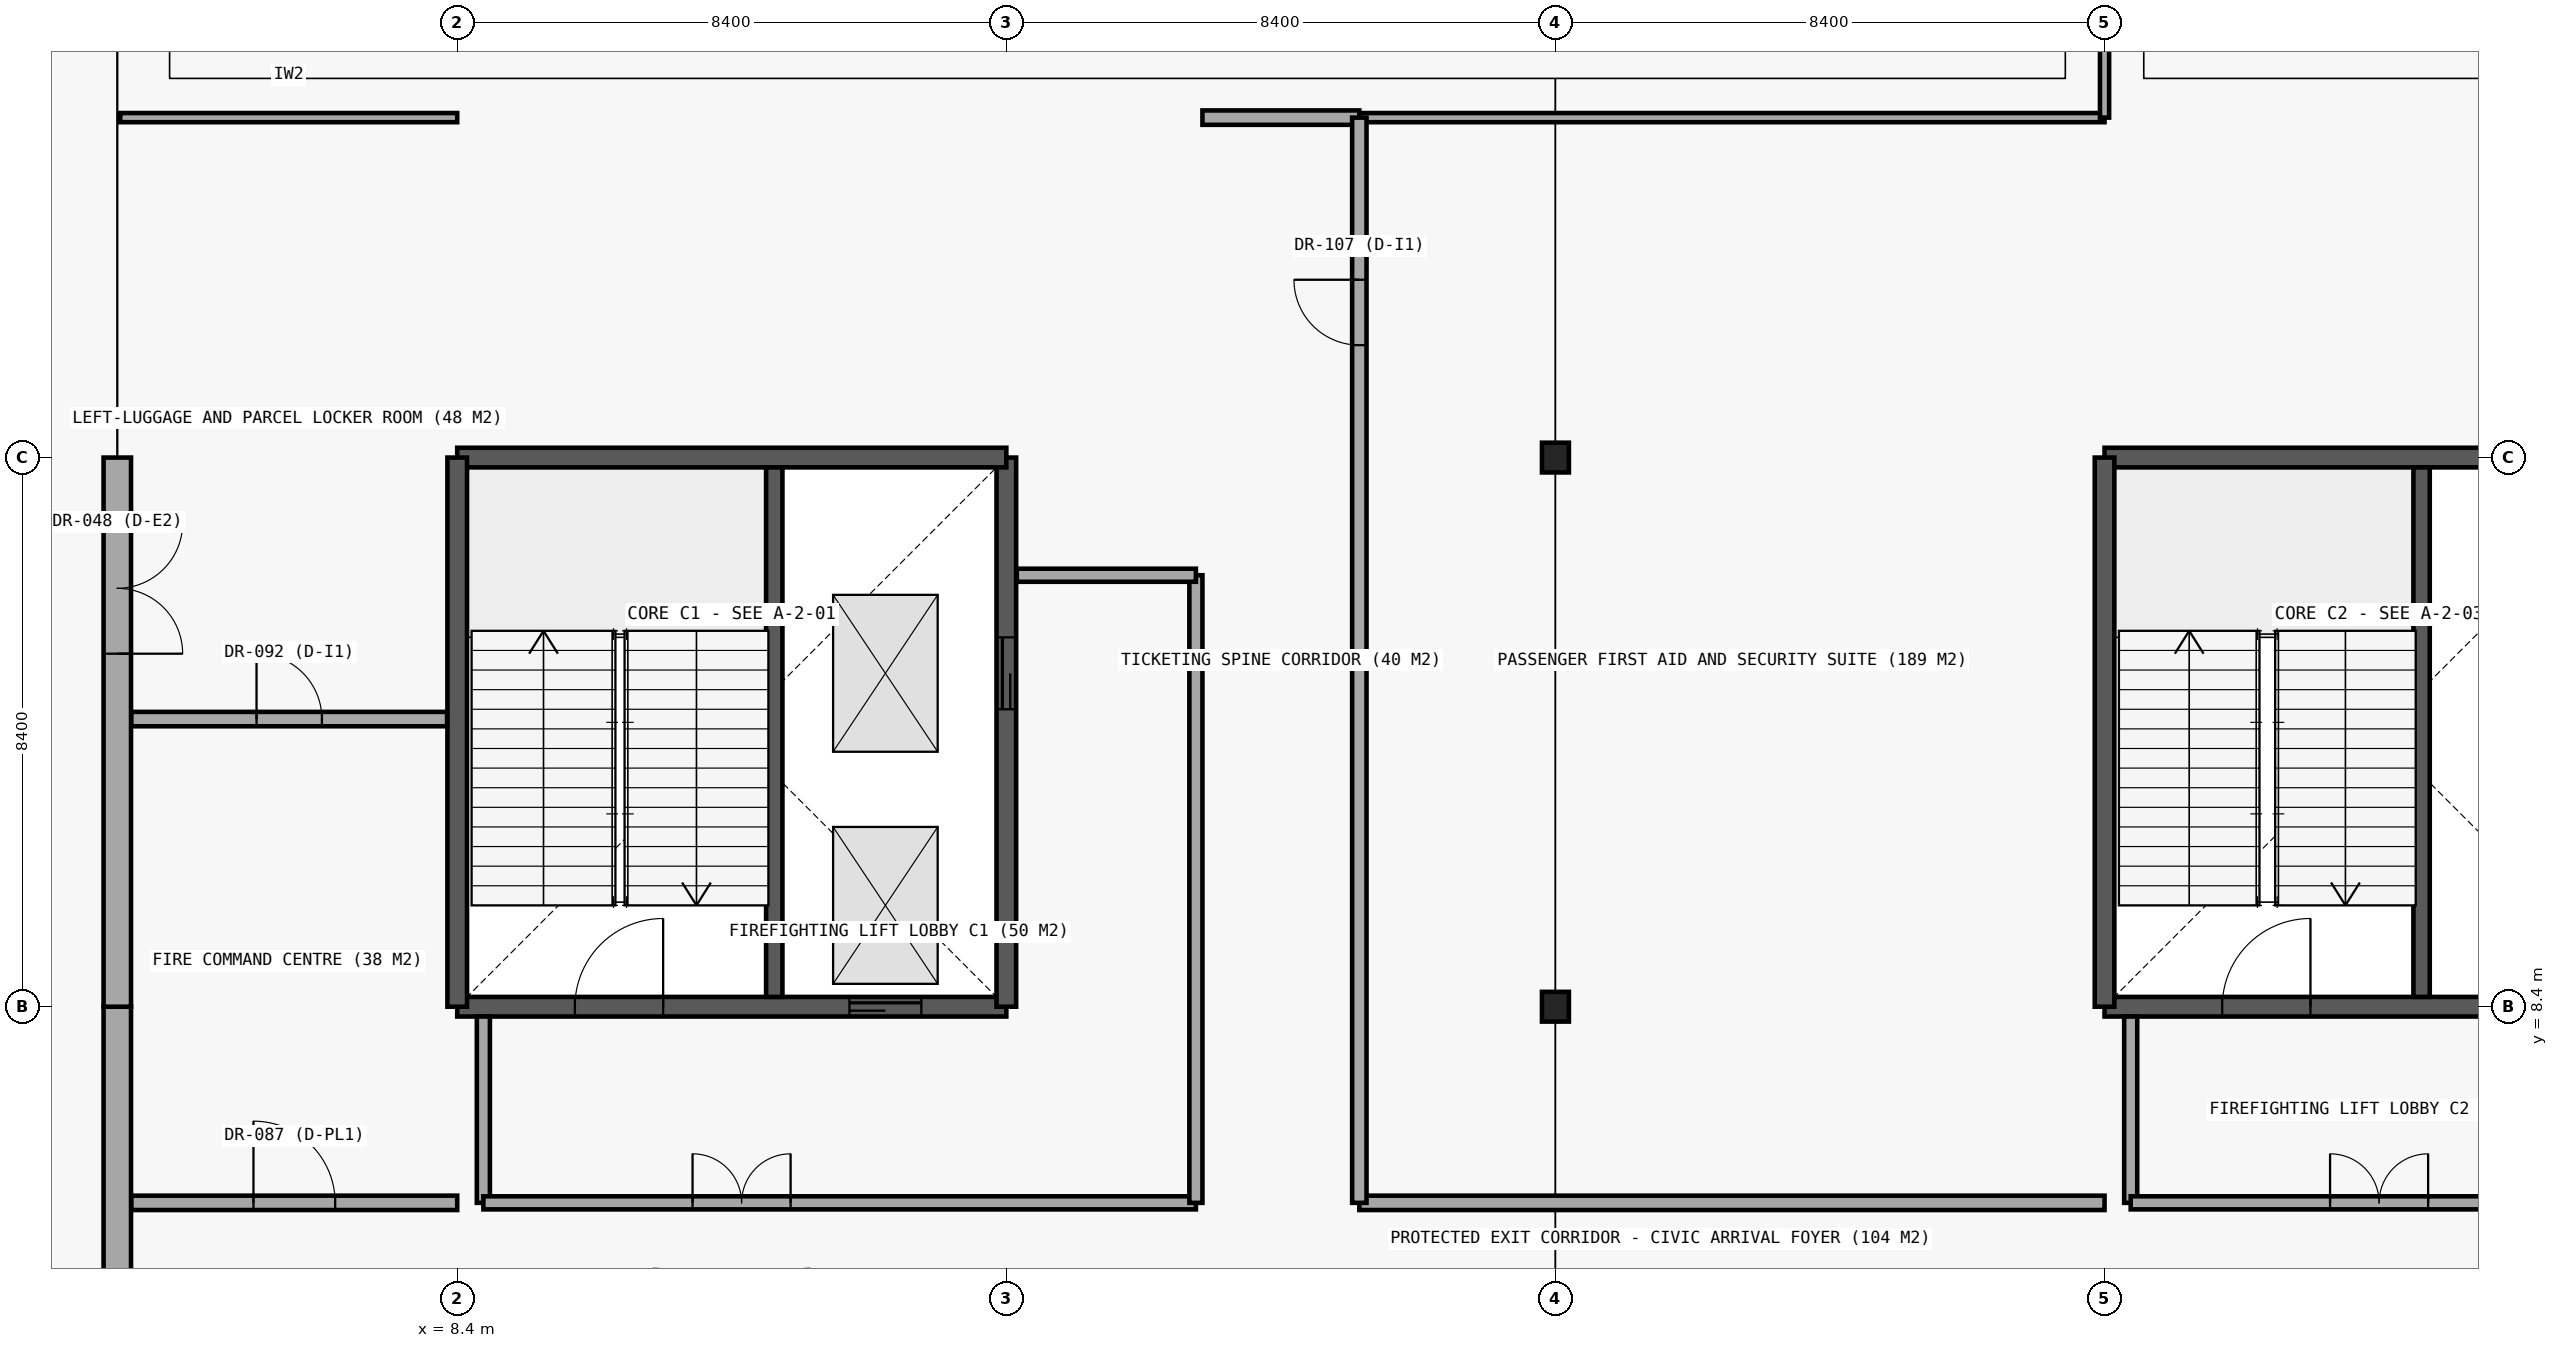
"""IFC4 building model, lengths in metres.
Left out: names, types, materials, properties, quantities, classifications, styles, units other than length and angle.
Written with IfcOpenShell. Run it as: python <this file> out.ifc"""

import sys

from ifc_helpers import new_model, si_unit, direction, frame, frame_2d, origin, origin_2d, place, context, subcontext, project, spatial, rectangle, i_section, extrude, element, fill, save


model = new_model("IFC4")
c1 = context("Model", 3, precision=1e-05, world=origin(), true_north=direction((0.0, 1.0)))
c2 = subcontext(c1, "Body", "Model", "MODEL_VIEW")
j1 = project(units=[si_unit("LENGTHUNIT", "METRE"), si_unit("PLANEANGLEUNIT", "RADIAN")], contexts=[c1])
p1 = place(None, origin())
s1 = spatial("IfcSite", under=j1, at=p1, CompositionType="ELEMENT")
p2 = place(p1, origin())
s2 = spatial("IfcBuilding", under=s1, at=p2, CompositionType="ELEMENT")
p3 = place(p2, origin())
s3 = spatial("IfcBuildingStorey", under=s2, at=p3, CompositionType="ELEMENT", Elevation=0.0)
p4 = place(p3, frame((8.4, 8.4, 0.0), z_axis=(0.0, 0.0, 1.0), x_axis=(1.0, 0.0, 0.0)))
e1 = element("IfcWall", 1, at=p4, inside=s3, PredefinedType="SHEAR", context=c2, shape_type="SweptSolid", body=[
    extrude(rectangle(XDim=8.4, YDim=0.3, at=frame_2d((4.2, 0.0))), origin(), (0.0, 0.0, 1.0), 4.8),
])
p5 = place(p4, frame((1.8, 0.0, 0.0)))
e2 = element("IfcOpeningElement", 2, at=p5, cuts=e1, PredefinedType="OPENING", context=c2, shape_type="SweptSolid", body=[
    extrude(rectangle(XDim=1.35, YDim=2.2, at=frame_2d((0.675, 1.1))), frame((0.0, 0.16, 0.0), z_axis=(0.0, -1.0, 0.0), x_axis=(1.0, 0.0, 0.0)), (0.0, 0.0, 1.0), 0.32),
])
p6 = place(p4, frame((6.0, 0.0, 0.0)))
e3 = element("IfcOpeningElement", 3, at=p6, cuts=e1, PredefinedType="OPENING", context=c2, shape_type="SweptSolid", body=[
    extrude(rectangle(XDim=1.1, YDim=2.2, at=frame_2d((0.55, 1.1))), frame((0.0, 0.16, 0.0), z_axis=(0.0, -1.0, 0.0), x_axis=(1.0, 0.0, 0.0)), (0.0, 0.0, 1.0), 0.32),
])
p7 = place(p3, frame((16.8, 8.4, 0.0), z_axis=(0.0, 0.0, 1.0), x_axis=(0.0, 1.0, 0.0)))
e4 = element("IfcWall", 4, at=p7, inside=s3, PredefinedType="SHEAR", context=c2, shape_type="SweptSolid", body=[
    extrude(rectangle(XDim=8.4, YDim=0.3, at=frame_2d((4.2, 0.0))), origin(), (0.0, 0.0, 1.0), 4.8),
])
p8 = place(p7, frame((4.55, 0.0, 0.0)))
e5 = element("IfcOpeningElement", 5, at=p8, cuts=e4, PredefinedType="OPENING", context=c2, shape_type="SweptSolid", body=[
    extrude(rectangle(XDim=1.1, YDim=2.2, at=frame_2d((0.55, 1.1))), frame((0.0, 0.16, 0.0), z_axis=(0.0, -1.0, 0.0), x_axis=(1.0, 0.0, 0.0)), (0.0, 0.0, 1.0), 0.32),
])
for number, where, z_axis, x_axis in (
    (6, (16.8, 16.8, 0.0), (0.0, 0.0, 1.0), (-1.0, 0.0, 0.0)),
    (7, (8.4, 16.8, 0.0), (0.0, 0.0, 1.0), (0.0, -1.0, 0.0)),
):
    element("IfcWall", number, at=place(p3, frame(where, z_axis=z_axis, x_axis=x_axis)), inside=s3, PredefinedType="SHEAR", context=c2, shape_type="SweptSolid", body=[
        extrude(rectangle(XDim=8.4, YDim=0.3, at=frame_2d((4.2, 0.0))), origin(), (0.0, 0.0, 1.0), 4.8),
    ])
p9 = place(p3, frame((13.25, 8.55, 0.0), z_axis=(0.0, 0.0, 1.0), x_axis=(0.0, 1.0, 0.0)))
e8 = element("IfcWall", 8, at=p9, inside=s3, PredefinedType="SHEAR", context=c2, shape_type="SweptSolid", body=[
    extrude(rectangle(XDim=8.1, YDim=0.25, at=frame_2d((4.05, 0.0))), origin(), (0.0, 0.0, 1.0), 4.8),
])
p10 = place(p3, frame((33.6, 8.4, 0.0), z_axis=(0.0, 0.0, 1.0), x_axis=(1.0, 0.0, 0.0)))
e9 = element("IfcWall", 9, at=p10, inside=s3, PredefinedType="SHEAR", context=c2, shape_type="SweptSolid", body=[
    extrude(rectangle(XDim=8.4, YDim=0.3, at=frame_2d((4.2, 0.0))), origin(), (0.0, 0.0, 1.0), 4.8),
])
p11 = place(p10, frame((1.8, 0.0, 0.0)))
e10 = element("IfcOpeningElement", 10, at=p11, cuts=e9, PredefinedType="OPENING", context=c2, shape_type="SweptSolid", body=[
    extrude(rectangle(XDim=1.35, YDim=2.2, at=frame_2d((0.675, 1.1))), frame((0.0, 0.16, 0.0), z_axis=(0.0, -1.0, 0.0), x_axis=(1.0, 0.0, 0.0)), (0.0, 0.0, 1.0), 0.32),
])
p12 = place(p10, frame((6.0, 0.0, 0.0)))
e11 = element("IfcOpeningElement", 11, at=p12, cuts=e9, PredefinedType="OPENING", context=c2, shape_type="SweptSolid", body=[
    extrude(rectangle(XDim=1.1, YDim=2.2, at=frame_2d((0.55, 1.1))), frame((0.0, 0.16, 0.0), z_axis=(0.0, -1.0, 0.0), x_axis=(1.0, 0.0, 0.0)), (0.0, 0.0, 1.0), 0.32),
])
p13 = place(p3, frame((42.0, 16.8, 0.0), z_axis=(0.0, 0.0, 1.0), x_axis=(-1.0, 0.0, 0.0)))
e12 = element("IfcWall", 12, at=p13, inside=s3, PredefinedType="SHEAR", context=c2, shape_type="SweptSolid", body=[
    extrude(rectangle(XDim=8.4, YDim=0.3, at=frame_2d((4.2, 0.0))), origin(), (0.0, 0.0, 1.0), 4.8),
])
p14 = place(p3, frame((33.6, 16.8, 0.0), z_axis=(0.0, 0.0, 1.0), x_axis=(0.0, -1.0, 0.0)))
e13 = element("IfcWall", 13, at=p14, inside=s3, PredefinedType="SHEAR", context=c2, shape_type="SweptSolid", body=[
    extrude(rectangle(XDim=8.4, YDim=0.3, at=frame_2d((4.2, 0.0))), origin(), (0.0, 0.0, 1.0), 4.8),
])
p15 = place(p3, frame((38.45, 8.55, 0.0), z_axis=(0.0, 0.0, 1.0), x_axis=(0.0, 1.0, 0.0)))
e14 = element("IfcWall", 14, at=p15, inside=s3, PredefinedType="SHEAR", context=c2, shape_type="SweptSolid", body=[
    extrude(rectangle(XDim=8.1, YDim=0.25, at=frame_2d((4.05, 0.0))), origin(), (0.0, 0.0, 1.0), 4.8),
])
for number, where, z_axis, x_axis in (
    (15, (25.2, 8.4, 0.0), (0.0, 0.0, 1.0), (1.0, 0.0, 0.0)),
    (16, (25.2, 16.8, 0.0), (0.0, 0.0, 1.0), (1.0, 0.0, 0.0)),
):
    element("IfcColumn", number, at=place(p3, frame(where, z_axis=z_axis, x_axis=x_axis)), inside=s3, PredefinedType="COLUMN", context=c2, shape_type="SweptSolid", body=[
        extrude(i_section(OverallWidth=0.412, OverallDepth=0.455, WebThickness=0.031, FlangeThickness=0.049, FilletRadius=0.015, at=origin_2d()), origin(), (0.0, 0.0, 1.0), 4.8),
    ])
p16 = place(p3, frame((3.2, 8.4, 0.0), z_axis=(0.0, 0.0, 1.0), x_axis=(0.0, -1.0, 0.0)))
e17 = element("IfcWall", 17, at=p16, inside=s3, PredefinedType="STANDARD", context=c2, shape_type="SweptSolid", body=[
    extrude(rectangle(XDim=5.2, YDim=0.42, at=frame_2d((2.6, 0.0))), origin(), (0.0, 0.0, 1.0), 4.18),
])
p17 = place(p3, frame((3.2, 16.8, 0.0), z_axis=(0.0, 0.0, 1.0), x_axis=(0.0, -1.0, 0.0)))
e18 = element("IfcWall", 18, at=p17, inside=s3, PredefinedType="STANDARD", context=c2, shape_type="SweptSolid", body=[
    extrude(rectangle(XDim=8.4, YDim=0.42, at=frame_2d((4.2, 0.0))), origin(), (0.0, 0.0, 1.0), 4.18),
])
p18 = place(p17, frame((1.0, 0.0, 0.0)))
e19 = element("IfcOpeningElement", 19, at=p18, cuts=e18, PredefinedType="OPENING", context=c2, shape_type="SweptSolid", body=[
    extrude(rectangle(XDim=2.0, YDim=2.4, at=frame_2d((1.0, 1.2))), frame((0.0, 0.22, 0.0), z_axis=(0.0, -1.0, 0.0), x_axis=(1.0, 0.0, 0.0)), (0.0, 0.0, 1.0), 0.44),
])
p19 = place(p3, frame((8.8, 5.4, 0.0), z_axis=(0.0, 0.0, 1.0), x_axis=(0.0, 1.0, 0.0)))
e20 = element("IfcWall", 20, at=p19, inside=s3, PredefinedType="PARTITIONING", context=c2, shape_type="SweptSolid", body=[
    extrude(rectangle(XDim=2.85, YDim=0.2, at=frame_2d((1.425, 0.0))), origin(), (0.0, 0.0, 1.0), 4.12),
])
p20 = place(p3, frame((8.8, 5.4, 0.0), z_axis=(0.0, 0.0, 1.0), x_axis=(1.0, 0.0, 0.0)))
e21 = element("IfcWall", 21, at=p20, inside=s3, PredefinedType="PARTITIONING", context=c2, shape_type="SweptSolid", body=[
    extrude(rectangle(XDim=10.9, YDim=0.2, at=frame_2d((5.45, 0.0))), origin(), (0.0, 0.0, 1.0), 4.12),
])
p21 = place(p20, frame((3.2, 0.0, 0.0)))
e22 = element("IfcOpeningElement", 22, at=p21, cuts=e21, PredefinedType="OPENING", context=c2, shape_type="SweptSolid", body=[
    extrude(rectangle(XDim=1.5, YDim=2.2, at=frame_2d((0.75, 1.1))), frame((0.0, 0.11, 0.0), z_axis=(0.0, -1.0, 0.0), x_axis=(1.0, 0.0, 0.0)), (0.0, 0.0, 1.0), 0.22),
])
p22 = place(p3, frame((19.7, 5.4, 0.0), z_axis=(0.0, 0.0, 1.0), x_axis=(0.0, 1.0, 0.0)))
e23 = element("IfcWall", 23, at=p22, inside=s3, PredefinedType="PARTITIONING", context=c2, shape_type="SweptSolid", body=[
    extrude(rectangle(XDim=9.6, YDim=0.2, at=frame_2d((4.8, 0.0))), origin(), (0.0, 0.0, 1.0), 4.12),
])
p23 = place(p3, frame((16.96, 15.0, 0.0), z_axis=(0.0, 0.0, 1.0), x_axis=(1.0, 0.0, 0.0)))
e24 = element("IfcWall", 24, at=p23, inside=s3, PredefinedType="PARTITIONING", context=c2, shape_type="SweptSolid", body=[
    extrude(rectangle(XDim=2.74, YDim=0.2, at=frame_2d((1.37, 0.0))), origin(), (0.0, 0.0, 1.0), 4.12),
])
p24 = place(p3, frame((34.0, 5.4, 0.0), z_axis=(0.0, 0.0, 1.0), x_axis=(0.0, 1.0, 0.0)))
e25 = element("IfcWall", 25, at=p24, inside=s3, PredefinedType="PARTITIONING", context=c2, shape_type="SweptSolid", body=[
    extrude(rectangle(XDim=2.85, YDim=0.2, at=frame_2d((1.425, 0.0))), origin(), (0.0, 0.0, 1.0), 4.09),
])
p25 = place(p3, frame((34.0, 5.4, 0.0), z_axis=(0.0, 0.0, 1.0), x_axis=(1.0, 0.0, 0.0)))
e26 = element("IfcWall", 26, at=p25, inside=s3, PredefinedType="PARTITIONING", context=c2, shape_type="SweptSolid", body=[
    extrude(rectangle(XDim=7.6, YDim=0.2, at=frame_2d((3.8, 0.0))), origin(), (0.0, 0.0, 1.0), 4.12),
])
p26 = place(p25, frame((3.05, 0.0, 0.0)))
e27 = element("IfcOpeningElement", 27, at=p26, cuts=e26, PredefinedType="OPENING", context=c2, shape_type="SweptSolid", body=[
    extrude(rectangle(XDim=1.5, YDim=2.2, at=frame_2d((0.75, 1.1))), frame((0.0, 0.11, 0.0), z_axis=(0.0, -1.0, 0.0), x_axis=(1.0, 0.0, 0.0)), (0.0, 0.0, 1.0), 0.22),
])
p27 = place(p3, frame((3.415, 5.4, 0.0), z_axis=(0.0, 0.0, 1.0), x_axis=(1.0, 0.0, 0.0)))
e28 = element("IfcWall", 28, at=p27, inside=s3, PredefinedType="PARTITIONING", context=c2, shape_type="SweptSolid", body=[
    extrude(rectangle(XDim=4.985, YDim=0.22, at=frame_2d((2.492, 0.0))), origin(), (0.0, 0.0, 1.0), 4.1),
])
p28 = place(p27, frame((1.868, 0.0, 0.0)))
e29 = element("IfcOpeningElement", 29, at=p28, cuts=e28, PredefinedType="OPENING", context=c2, shape_type="SweptSolid", body=[
    extrude(rectangle(XDim=1.25, YDim=2.2, at=frame_2d((0.625, 1.1))), frame((0.0, 0.12, 0.0), z_axis=(0.0, -1.0, 0.0), x_axis=(1.0, 0.0, 0.0)), (0.0, 0.0, 1.0), 0.24),
])
p29 = place(p3, frame((22.2, 5.4, 0.0), z_axis=(0.0, 0.0, 1.0), x_axis=(1.0, 0.0, 0.0)))
e30 = element("IfcWall", 30, at=p29, inside=s3, PredefinedType="PARTITIONING", context=c2, shape_type="SweptSolid", body=[
    extrude(rectangle(XDim=11.4, YDim=0.22, at=frame_2d((5.7, 0.0))), origin(), (0.0, 0.0, 1.0), 4.1),
])
p30 = place(p3, frame((3.415, 12.8, 0.0), z_axis=(0.0, 0.0, 1.0), x_axis=(1.0, 0.0, 0.0)))
e31 = element("IfcWall", 31, at=p30, inside=s3, PredefinedType="PARTITIONING", context=c2, shape_type="SweptSolid", body=[
    extrude(rectangle(XDim=4.83, YDim=0.22, at=frame_2d((2.415, 0.0))), origin(), (0.0, 0.0, 1.0), 4.1),
])
p31 = place(p30, frame((1.915, 0.0, 0.0)))
e32 = element("IfcOpeningElement", 32, at=p31, cuts=e31, PredefinedType="OPENING", context=c2, shape_type="SweptSolid", body=[
    extrude(rectangle(XDim=1.0, YDim=2.15, at=frame_2d((0.5, 1.075))), frame((0.0, 0.12, 0.0), z_axis=(0.0, -1.0, 0.0), x_axis=(1.0, 0.0, 0.0)), (0.0, 0.0, 1.0), 0.24),
])
p32 = place(p3, frame((3.245, 22.0, 0.0), z_axis=(0.0, 0.0, 1.0), x_axis=(1.0, 0.0, 0.0)))
e33 = element("IfcWall", 33, at=p32, inside=s3, PredefinedType="PARTITIONING", context=c2, shape_type="SweptSolid", body=[
    extrude(rectangle(XDim=5.155, YDim=0.14, at=frame_2d((2.577, 0.0))), origin(), (0.0, 0.0, 1.0), 4.1),
])
p33 = place(p3, frame((19.8, 22.0, 0.0), z_axis=(0.0, 0.0, 1.0), x_axis=(1.0, 0.0, 0.0)))
e34 = element("IfcWall", 34, at=p33, inside=s3, PredefinedType="PARTITIONING", context=c2, shape_type="SweptSolid", body=[
    extrude(rectangle(XDim=2.4, YDim=0.22, at=frame_2d((1.2, 0.0))), origin(), (0.0, 0.0, 1.0), 4.1),
])
p34 = place(p3, frame((22.2, 22.0, 0.0), z_axis=(0.0, 0.0, 1.0), x_axis=(1.0, 0.0, 0.0)))
e35 = element("IfcWall", 35, at=p34, inside=s3, PredefinedType="PARTITIONING", context=c2, shape_type="SweptSolid", body=[
    extrude(rectangle(XDim=11.4, YDim=0.14, at=frame_2d((5.7, 0.0))), origin(), (0.0, 0.0, 1.0), 4.1),
])
p35 = place(p3, frame((22.2, 5.4, 0.0), z_axis=(0.0, 0.0, 1.0), x_axis=(0.0, 1.0, 0.0)))
e36 = element("IfcWall", 36, at=p35, inside=s3, PredefinedType="PARTITIONING", context=c2, shape_type="SweptSolid", body=[
    extrude(rectangle(XDim=16.6, YDim=0.22, at=frame_2d((8.3, 0.0))), origin(), (0.0, 0.0, 1.0), 4.1),
])
p36 = place(p35, frame((13.12, 0.0, 0.0)))
e37 = element("IfcOpeningElement", 37, at=p36, cuts=e36, PredefinedType="OPENING", context=c2, shape_type="SweptSolid", body=[
    extrude(rectangle(XDim=1.0, YDim=2.15, at=frame_2d((0.5, 1.075))), frame((0.0, 0.12, 0.0), z_axis=(0.0, -1.0, 0.0), x_axis=(1.0, 0.0, 0.0)), (0.0, 0.0, 1.0), 0.24),
])
p37 = place(p3, frame((33.6, 22.0, 0.0), z_axis=(0.0, 0.0, 1.0), x_axis=(0.0, 1.0, 0.0)))
e38 = element("IfcWall", 38, at=p37, inside=s3, PredefinedType="PARTITIONING", context=c2, shape_type="SweptSolid", body=[
    extrude(rectangle(XDim=3.0, YDim=0.14, at=frame_2d((1.5, 0.0))), origin(), (0.0, 0.0, 1.0), 4.09),
])
p38 = place(p18, origin())
e39 = element("IfcDoor", 39, at=p38, inside=s3, OperationType="DOUBLE_DOOR_SINGLE_SWING", PredefinedType="DOOR", context=c2, shape_type="SweptSolid", body=[
    extrude(rectangle(XDim=2.0, YDim=2.4, at=frame_2d((1.0, 1.2))), frame((0.0, 0.025, 0.0), z_axis=(0.0, -1.0, 0.0), x_axis=(1.0, 0.0, 0.0)), (0.0, 0.0, 1.0), 0.05),
])
fill(e19, e39)
p39 = place(p5, origin())
e40 = element("IfcDoor", 40, at=p39, inside=s3, OperationType="SINGLE_SWING_RIGHT", PredefinedType="DOOR", context=c2, shape_type="SweptSolid", body=[
    extrude(rectangle(XDim=1.35, YDim=2.2, at=frame_2d((0.675, 1.1))), frame((0.0, 0.025, 0.0), z_axis=(0.0, -1.0, 0.0), x_axis=(1.0, 0.0, 0.0)), (0.0, 0.0, 1.0), 0.05),
])
fill(e2, e40)
p40 = place(p6, origin())
e41 = element("IfcDoor", 41, at=p40, inside=s3, OperationType="SLIDING_TO_LEFT", PredefinedType="DOOR", context=c2, shape_type="SweptSolid", body=[
    extrude(rectangle(XDim=1.1, YDim=2.2, at=frame_2d((0.55, 1.1))), frame((0.0, 0.025, 0.0), z_axis=(0.0, -1.0, 0.0), x_axis=(1.0, 0.0, 0.0)), (0.0, 0.0, 1.0), 0.05),
])
fill(e3, e41)
p41 = place(p8, origin())
e42 = element("IfcDoor", 42, at=p41, inside=s3, OperationType="SLIDING_TO_RIGHT", PredefinedType="DOOR", context=c2, shape_type="SweptSolid", body=[
    extrude(rectangle(XDim=1.1, YDim=2.2, at=frame_2d((0.55, 1.1))), frame((0.0, 0.025, 0.0), z_axis=(0.0, -1.0, 0.0), x_axis=(1.0, 0.0, 0.0)), (0.0, 0.0, 1.0), 0.05),
])
fill(e5, e42)
p42 = place(p21, origin())
e43 = element("IfcDoor", 43, at=p42, inside=s3, OperationType="DOUBLE_DOOR_SINGLE_SWING", PredefinedType="DOOR", context=c2, shape_type="SweptSolid", body=[
    extrude(rectangle(XDim=1.5, YDim=2.2, at=frame_2d((0.75, 1.1))), frame((0.0, 0.025, 0.0), z_axis=(0.0, -1.0, 0.0), x_axis=(1.0, 0.0, 0.0)), (0.0, 0.0, 1.0), 0.05),
])
fill(e22, e43)
p43 = place(p11, origin())
e44 = element("IfcDoor", 44, at=p43, inside=s3, OperationType="SINGLE_SWING_RIGHT", PredefinedType="DOOR", context=c2, shape_type="SweptSolid", body=[
    extrude(rectangle(XDim=1.35, YDim=2.2, at=frame_2d((0.675, 1.1))), frame((0.0, 0.025, 0.0), z_axis=(0.0, -1.0, 0.0), x_axis=(1.0, 0.0, 0.0)), (0.0, 0.0, 1.0), 0.05),
])
fill(e10, e44)
p44 = place(p26, origin())
e45 = element("IfcDoor", 45, at=p44, inside=s3, OperationType="DOUBLE_DOOR_SINGLE_SWING", PredefinedType="DOOR", context=c2, shape_type="SweptSolid", body=[
    extrude(rectangle(XDim=1.5, YDim=2.2, at=frame_2d((0.75, 1.1))), frame((0.0, 0.025, 0.0), z_axis=(0.0, -1.0, 0.0), x_axis=(1.0, 0.0, 0.0)), (0.0, 0.0, 1.0), 0.05),
])
fill(e27, e45)
p45 = place(p28, origin())
e46 = element("IfcDoor", 46, at=p45, inside=s3, OperationType="SINGLE_SWING_LEFT", PredefinedType="DOOR", context=c2, shape_type="SweptSolid", body=[
    extrude(rectangle(XDim=1.25, YDim=2.2, at=frame_2d((0.625, 1.1))), frame((0.0, 0.025, 0.0), z_axis=(0.0, -1.0, 0.0), x_axis=(1.0, 0.0, 0.0)), (0.0, 0.0, 1.0), 0.05),
])
fill(e29, e46)
p46 = place(p31, origin())
e47 = element("IfcDoor", 47, at=p46, inside=s3, OperationType="SINGLE_SWING_LEFT", PredefinedType="DOOR", context=c2, shape_type="SweptSolid", body=[
    extrude(rectangle(XDim=1.0, YDim=2.15, at=frame_2d((0.5, 1.075))), frame((0.0, 0.025, 0.0), z_axis=(0.0, -1.0, 0.0), x_axis=(1.0, 0.0, 0.0)), (0.0, 0.0, 1.0), 0.05),
])
fill(e32, e47)
p47 = place(p36, origin())
e48 = element("IfcDoor", 48, at=p47, inside=s3, OperationType="SINGLE_SWING_RIGHT", PredefinedType="DOOR", context=c2, shape_type="SweptSolid", body=[
    extrude(rectangle(XDim=1.0, YDim=2.15, at=frame_2d((0.5, 1.075))), frame((0.0, 0.025, 0.0), z_axis=(0.0, -1.0, 0.0), x_axis=(1.0, 0.0, 0.0)), (0.0, 0.0, 1.0), 0.05),
])
fill(e37, e48)
save(model, sys.argv[1])
